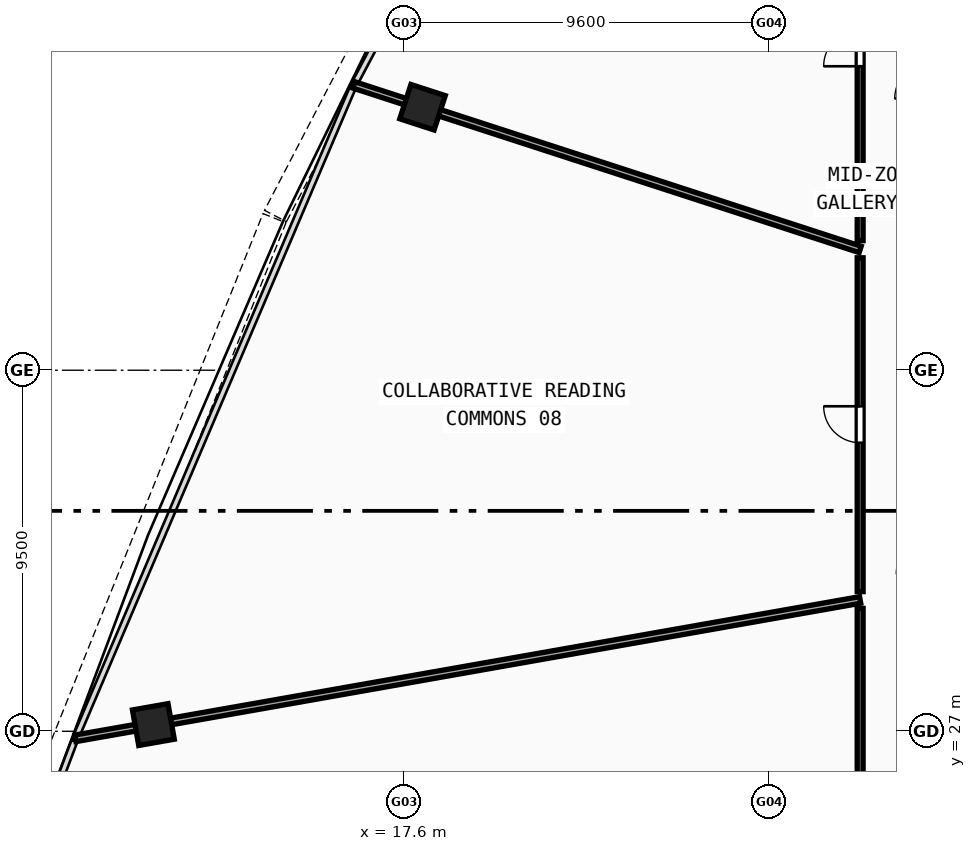
"""IFC4 building model, lengths in metres.
Left out: names, types, materials, properties, quantities, classifications, styles, units other than length and angle.
Written with IfcOpenShell. Run it as: python <this file> out.ifc"""

import sys

from ifc_helpers import new_model, si_unit, direction, frame, frame_2d, origin, origin_with_axes, origin_2d, place, context, subcontext, project, spatial, rectangle, hollow_rectangle, extrude, source, transform, mapped, element, fill, save


model = new_model("IFC4")
c1 = context("Model", 3, precision=1e-05, world=origin(), true_north=direction((0.0, 1.0)))
c2 = subcontext(c1, "Body", "Model", "MODEL_VIEW")
j1 = project(units=[si_unit("LENGTHUNIT", "METRE"), si_unit("PLANEANGLEUNIT", "RADIAN")], contexts=[c1])
p1 = place(None, origin())
s1 = spatial("IfcSite", under=j1, at=p1, CompositionType="ELEMENT")
p2 = place(p1, origin())
s2 = spatial("IfcBuilding", under=s1, at=p2, CompositionType="ELEMENT")
p3 = place(p2, frame((0.0, 0.0, 129.83)))
s3 = spatial("IfcBuildingStorey", under=s2, at=p3, CompositionType="ELEMENT", Elevation=129.83)
m1 = source(origin(), c2, "Body", "SweptSolid", [
    extrude(hollow_rectangle(XDim=0.95, YDim=0.95, WallThickness=0.04, at=origin_2d()), origin(), (0.0, 0.0, 1.0), 3.68),
])
for number, where, z_axis, x_axis in (
    (1, (18.085, 43.42, -0.26), (0.0, 0.0, 1.0), (-0.309, -0.951, 0.0)),
    (2, (11.003, 27.177, -0.26), (0.0, 0.0, 1.0), (0.174, -0.985, 0.0)),
):
    element("IfcColumn", number, at=place(p3, frame(where, z_axis=z_axis, x_axis=x_axis)), inside=s3, PredefinedType="COLUMN", context=c2, shape_type="MappedRepresentation", body=[
        mapped(m1, transform((0.0, 0.0, 0.0), scale=1.0)),
    ])
p4 = place(p3, frame((29.6, 39.678, 0.0), z_axis=(0.0, 0.0, 1.0), x_axis=(-0.95105622709, 0.309017884457, 0.0)))
e3 = element("IfcWall", 3, at=p4, inside=s3, PredefinedType="PARTITIONING", context=c2, shape_type="SweptSolid", body=[
    extrude(rectangle(XDim=14.006, YDim=0.175, at=frame_2d((7.003, 0.0))), origin(), (0.0, 0.0, 1.0), 2.77),
])
p5 = place(p3, frame((29.6, 30.456, 0.0), z_axis=(0.0, 0.0, 1.0), x_axis=(-0.98480711194, -0.173651813328, 0.0)))
e4 = element("IfcWall", 4, at=p5, inside=s3, PredefinedType="PARTITIONING", context=c2, shape_type="SweptSolid", body=[
    extrude(rectangle(XDim=20.967, YDim=0.175, at=frame_2d((10.483, 0.0))), origin(), (0.0, 0.0, 1.0), 2.77),
])
p6 = place(p3, frame((29.6, 21.8, 0.0), z_axis=(0.0, 0.0, 1.0), x_axis=(0.0, 1.0, 0.0)))
e5 = element("IfcWall", 5, at=p6, inside=s3, PredefinedType="PARTITIONING", context=c2, shape_type="SweptSolid", body=[
    extrude(rectangle(XDim=8.432, YDim=0.155, at=frame_2d((4.216, 0.0))), origin(), (0.0, 0.0, 1.0), 3.02),
])
p7 = place(p3, frame((29.6, 30.675, 0.0), z_axis=(0.0, 0.0, 1.0), x_axis=(0.0, 1.0, 0.0)))
e6 = element("IfcWall", 6, at=p7, inside=s3, PredefinedType="PARTITIONING", context=c2, shape_type="SweptSolid", body=[
    extrude(rectangle(XDim=8.783, YDim=0.155, at=frame_2d((4.392, 0.0))), origin(), (0.0, 0.0, 1.0), 3.42),
])
p8 = place(p7, frame((3.917, 0.0, 0.0)))
e7 = element("IfcOpeningElement", 7, at=p8, cuts=e6, PredefinedType="OPENING", context=c2, shape_type="SweptSolid", body=[
    extrude(rectangle(XDim=0.96, YDim=2.12, at=frame_2d((0.48, 1.06))), frame((0.0, 0.087, 0.0), z_axis=(0.0, -1.0, 0.0), x_axis=(1.0, 0.0, 0.0)), (0.0, 0.0, 1.0), 0.175),
])
p9 = place(p3, frame((29.6, 39.91, 0.0), z_axis=(0.0, 0.0, 1.0), x_axis=(0.0, 1.0, 0.0)))
e8 = element("IfcWall", 8, at=p9, inside=s3, PredefinedType="PARTITIONING", context=c2, shape_type="SweptSolid", body=[
    extrude(rectangle(XDim=10.138, YDim=0.155, at=frame_2d((5.069, 0.0))), origin(), (0.0, 0.0, 1.0), 2.77),
])
p10 = place(p9, frame((4.588, 0.0, 0.0)))
e9 = element("IfcOpeningElement", 9, at=p10, cuts=e8, PredefinedType="OPENING", context=c2, shape_type="SweptSolid", body=[
    extrude(rectangle(XDim=0.96, YDim=2.12, at=frame_2d((0.48, 1.06))), frame((0.0, 0.087, 0.0), z_axis=(0.0, -1.0, 0.0), x_axis=(1.0, 0.0, 0.0)), (0.0, 0.0, 1.0), 0.175),
])
m2 = source(origin(), c2, "Body", "SweptSolid", [
    extrude(rectangle(XDim=0.96, YDim=2.12, at=frame_2d((0.48, 1.06))), frame((0.0, 0.025, 0.0), z_axis=(0.0, -1.0, 0.0), x_axis=(1.0, 0.0, 0.0)), (0.0, 0.0, 1.0), 0.05),
])
p11 = place(p10, origin_with_axes())
e10 = element("IfcDoor", 10, at=p11, inside=s3, OperationType="SINGLE_SWING_LEFT", PredefinedType="DOOR", context=c2, shape_type="MappedRepresentation", body=[
    mapped(m2, transform((0.0, 0.0, 0.0), scale=1.0)),
])
fill(e9, e10)
p12 = place(p8, origin_with_axes())
e11 = element("IfcDoor", 11, at=p12, inside=s3, OperationType="SINGLE_SWING_RIGHT", PredefinedType="DOOR", context=c2, shape_type="MappedRepresentation", body=[
    mapped(m2, transform((0.0, 0.0, 0.0), scale=1.0)),
])
fill(e7, e11)
save(model, sys.argv[1])
